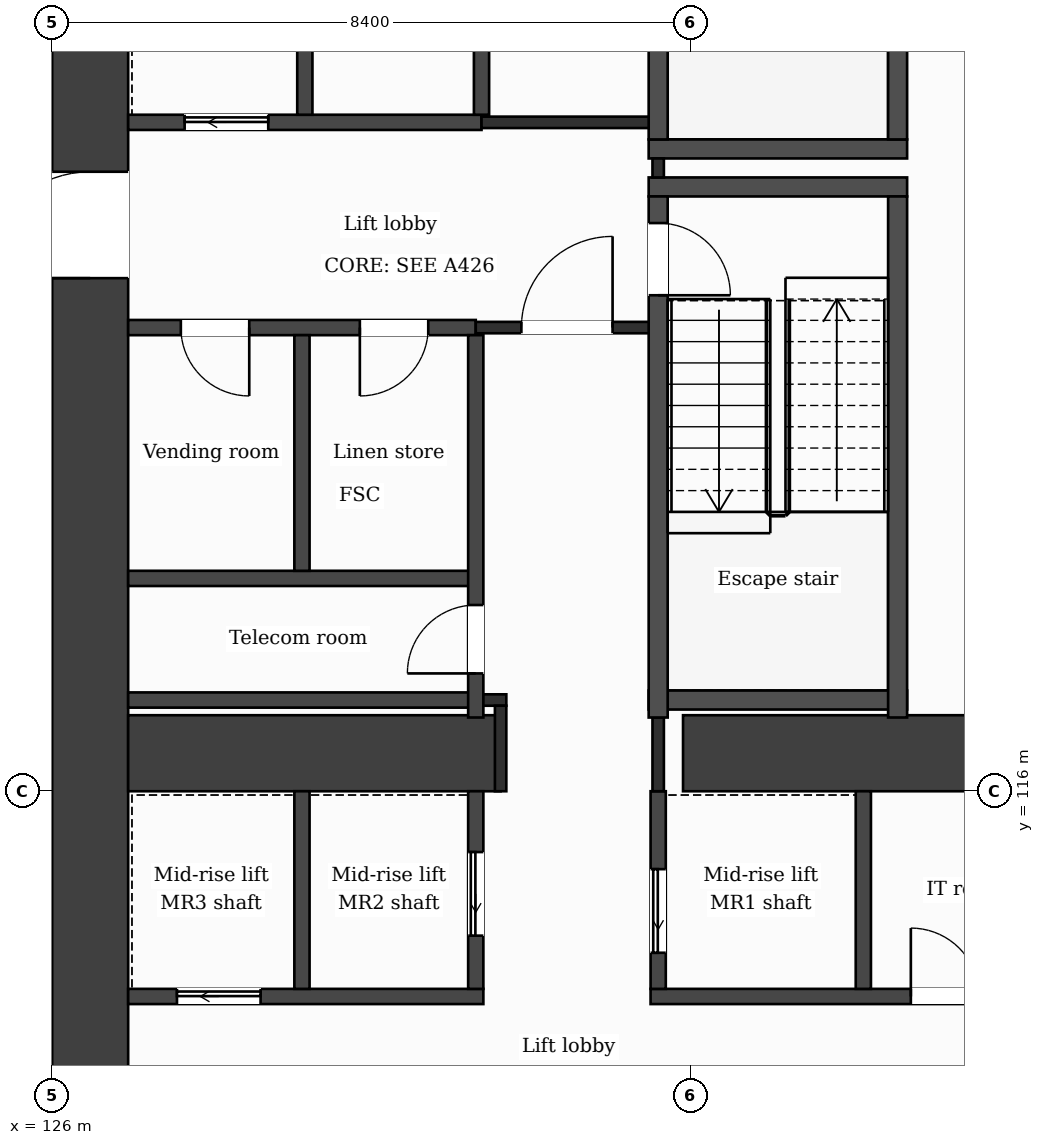
"""IFC4 building model, lengths in metres.
Left out: names, types, materials, properties, quantities, classifications, styles, units other than length and angle.
Written with IfcOpenShell. Run it as: python <this file> out.ifc"""

import sys

from ifc_helpers import new_model, si_unit, direction, frame, frame_2d, origin, place, context, subcontext, project, spatial, rectangle, extrude, element, fill, save


model = new_model("IFC4")
c1 = context("Model", 3, precision=1e-05, world=origin(), true_north=direction((0.0, 1.0)))
c2 = subcontext(c1, "Body", "Model", "MODEL_VIEW")
j1 = project(units=[si_unit("LENGTHUNIT", "METRE"), si_unit("PLANEANGLEUNIT", "RADIAN")], contexts=[c1])
p1 = place(None, origin())
s1 = spatial("IfcSite", under=j1, at=p1, CompositionType="ELEMENT")
p2 = place(p1, origin())
s2 = spatial("IfcBuilding", under=s1, at=p2, CompositionType="ELEMENT")
p3 = place(p2, frame((0.0, 0.0, 109.5)))
s3 = spatial("IfcBuildingStorey", under=s2, at=p3, CompositionType="ELEMENT", Elevation=109.5)
p4 = place(p3, frame((137.732, 131.9, 0.0), z_axis=(0.0, 0.0, 1.0), x_axis=(0.133411141623, -0.991060778808, 0.0)))
e1 = element("IfcWall", 1, at=p4, inside=s3, PredefinedType="SHEAR", context=c2, shape_type="SweptSolid", body=[
    extrude(rectangle(XDim=21.189, YDim=1.0, at=frame_2d((10.595, 0.0))), origin(), (0.0, 0.0, 1.0), 3.7),
])
p5 = place(p3, frame((126.5, 110.9, 0.0), z_axis=(0.0, 0.0, 1.0), x_axis=(0.0, 1.0, 0.0)))
e2 = element("IfcWall", 2, at=p5, inside=s3, PredefinedType="SHEAR", context=c2, shape_type="SweptSolid", body=[
    extrude(rectangle(XDim=21.0, YDim=1.0, at=frame_2d((10.5, 0.0))), origin(), (0.0, 0.0, 1.0), 3.7),
])
p6 = place(p5, frame((11.85, 0.0, 0.0)))
e3 = element("IfcOpeningElement", 3, at=p6, cuts=e2, PredefinedType="OPENING", context=c2, shape_type="SweptSolid", body=[
    extrude(rectangle(XDim=1.4, YDim=2.1, at=frame_2d((0.7, 1.05))), frame((0.0, 0.51, 0.0), z_axis=(0.0, -1.0, 0.0), x_axis=(1.0, 0.0, 0.0)), (0.0, 0.0, 1.0), 1.02),
])
p7 = place(p3, frame((127.0, 116.5, 0.0), z_axis=(0.0, 0.0, 1.0), x_axis=(1.0, 0.0, 0.0)))
e4 = element("IfcWall", 4, at=p7, inside=s3, PredefinedType="SHEAR", context=c2, shape_type="SweptSolid", body=[
    extrude(rectangle(XDim=4.9, YDim=1.0, at=frame_2d((2.45, 0.0))), origin(), (0.0, 0.0, 1.0), 3.7),
])
p8 = place(p3, frame((134.3, 116.5, 0.0), z_axis=(0.0, 0.0, 1.0), x_axis=(1.0, 0.0, 0.0)))
e5 = element("IfcWall", 5, at=p8, inside=s3, PredefinedType="SHEAR", context=c2, shape_type="SweptSolid", body=[
    extrude(rectangle(XDim=5.077, YDim=1.0, at=frame_2d((2.539, 0.0))), origin(), (0.0, 0.0, 1.0), 3.7),
])
p9 = place(p3, frame((127.0, 113.3, 0.0), z_axis=(0.0, 0.0, 1.0), x_axis=(1.0, 0.0, 0.0)))
e6 = element("IfcWall", 6, at=p9, inside=s3, PredefinedType="PARTITIONING", context=c2, shape_type="SweptSolid", body=[
    extrude(rectangle(XDim=4.673, YDim=0.2, at=frame_2d((2.336, 0.0))), origin(), (0.0, 0.0, 1.0), 3.38),
])
p10 = place(p9, frame((0.642, 0.0, 0.0)))
e7 = element("IfcOpeningElement", 7, at=p10, cuts=e6, PredefinedType="OPENING", context=c2, shape_type="SweptSolid", body=[
    extrude(rectangle(XDim=1.1, YDim=2.1, at=frame_2d((0.55, 1.05))), frame((0.0, 0.11, 0.0), z_axis=(0.0, -1.0, 0.0), x_axis=(1.0, 0.0, 0.0)), (0.0, 0.0, 1.0), 0.22),
])
p11 = place(p3, frame((133.873, 113.3, 0.0), z_axis=(0.0, 0.0, 1.0), x_axis=(1.0, 0.0, 0.0)))
e8 = element("IfcWall", 8, at=p11, inside=s3, PredefinedType="PARTITIONING", context=c2, shape_type="SweptSolid", body=[
    extrude(rectangle(XDim=5.888, YDim=0.2, at=frame_2d((2.944, 0.0))), origin(), (0.0, 0.0, 1.0), 3.38),
])
p12 = place(p11, frame((3.424, 0.0, 0.0)))
e9 = element("IfcOpeningElement", 9, at=p12, cuts=e8, PredefinedType="OPENING", context=c2, shape_type="SweptSolid", body=[
    extrude(rectangle(XDim=0.9, YDim=2.1, at=frame_2d((0.45, 1.05))), frame((0.0, 0.11, 0.0), z_axis=(0.0, -1.0, 0.0), x_axis=(1.0, 0.0, 0.0)), (0.0, 0.0, 1.0), 0.22),
])
p13 = place(p3, frame((127.0, 117.2, 0.0), z_axis=(0.0, 0.0, 1.0), x_axis=(1.0, 0.0, 0.0)))
e10 = element("IfcWall", 10, at=p13, inside=s3, PredefinedType="PARTITIONING", context=c2, shape_type="SweptSolid", body=[
    extrude(rectangle(XDim=4.573, YDim=0.2, at=frame_2d((2.287, 0.0))), origin(), (0.0, 0.0, 1.0), 3.38),
])
p14 = place(p3, frame((131.573, 117.2, 0.0), z_axis=(0.0, 0.0, 1.0), x_axis=(1.0, 0.0, 0.0)))
e11 = element("IfcWall", 11, at=p14, inside=s3, PredefinedType="PARTITIONING", context=c2, shape_type="SweptSolid", body=[
    extrude(rectangle(XDim=0.402, YDim=0.15, at=frame_2d((0.201, 0.0))), origin(), (0.0, 0.0, 1.0), 3.38),
])
p15 = place(p3, frame((133.848, 117.2, 0.0), z_axis=(0.0, 0.0, 1.0), x_axis=(1.0, 0.0, 0.0)))
e12 = element("IfcWall", 12, at=p15, inside=s3, PredefinedType="PARTITIONING", context=c2, shape_type="SweptSolid", body=[
    extrude(rectangle(XDim=3.4, YDim=0.25, at=frame_2d((1.7, 0.0))), origin(), (0.0, 0.0, 1.0), 3.38),
])
p16 = place(p3, frame((127.0, 118.8, 0.0), z_axis=(0.0, 0.0, 1.0), x_axis=(1.0, 0.0, 0.0)))
e13 = element("IfcWall", 13, at=p16, inside=s3, PredefinedType="PARTITIONING", context=c2, shape_type="SweptSolid", body=[
    extrude(rectangle(XDim=4.573, YDim=0.2, at=frame_2d((2.287, 0.0))), origin(), (0.0, 0.0, 1.0), 3.38),
])
p17 = place(p3, frame((127.0, 122.1, 0.0), z_axis=(0.0, 0.0, 1.0), x_axis=(1.0, 0.0, 0.0)))
e14 = element("IfcWall", 14, at=p17, inside=s3, PredefinedType="PARTITIONING", context=c2, shape_type="SweptSolid", body=[
    extrude(rectangle(XDim=4.573, YDim=0.2, at=frame_2d((2.287, 0.0))), origin(), (0.0, 0.0, 1.0), 3.38),
])
p18 = place(p17, frame((3.048, 0.0, 0.0)))
e15 = element("IfcOpeningElement", 15, at=p18, cuts=e14, PredefinedType="OPENING", context=c2, shape_type="SweptSolid", body=[
    extrude(rectangle(XDim=0.9, YDim=2.1, at=frame_2d((0.45, 1.05))), frame((0.0, 0.11, 0.0), z_axis=(0.0, -1.0, 0.0), x_axis=(1.0, 0.0, 0.0)), (0.0, 0.0, 1.0), 0.22),
])
p19 = place(p17, frame((0.693, 0.0, 0.0)))
e16 = element("IfcOpeningElement", 16, at=p19, cuts=e14, PredefinedType="OPENING", context=c2, shape_type="SweptSolid", body=[
    extrude(rectangle(XDim=0.9, YDim=2.1, at=frame_2d((0.45, 1.05))), frame((0.0, 0.11, 0.0), z_axis=(0.0, -1.0, 0.0), x_axis=(1.0, 0.0, 0.0)), (0.0, 0.0, 1.0), 0.22),
])
p20 = place(p3, frame((131.573, 122.1, 0.0), z_axis=(0.0, 0.0, 1.0), x_axis=(1.0, 0.0, 0.0)))
e17 = element("IfcWall", 17, at=p20, inside=s3, PredefinedType="PARTITIONING", context=c2, shape_type="SweptSolid", body=[
    extrude(rectangle(XDim=2.4, YDim=0.15, at=frame_2d((1.2, 0.0))), origin(), (0.0, 0.0, 1.0), 3.38),
])
p21 = place(p20, frame((0.6, 0.0, 0.0)))
e18 = element("IfcOpeningElement", 18, at=p21, cuts=e17, PredefinedType="OPENING", context=c2, shape_type="SweptSolid", body=[
    extrude(rectangle(XDim=1.2, YDim=2.1, at=frame_2d((0.6, 1.05))), frame((0.0, 0.085, 0.0), z_axis=(0.0, -1.0, 0.0), x_axis=(1.0, 0.0, 0.0)), (0.0, 0.0, 1.0), 0.17),
])
p22 = place(p3, frame((100.8, 122.45, 0.0), z_axis=(0.0, 0.0, 1.0), x_axis=(1.0, 0.0, 0.0)))
e19 = element("IfcWall", 19, at=p22, inside=s3, PredefinedType="PARTITIONING", context=c2, shape_type="SweptSolid", body=[
    extrude(rectangle(XDim=25.2, YDim=0.15, at=frame_2d((12.6, 0.0))), origin(), (0.0, 0.0, 1.0), 3.38),
])
for number, where, z_axis, x_axis in (
    (20, (133.848, 123.95, 0.0), (0.0, 0.0, 1.0), (1.0, 0.0, 0.0)),
    (21, (133.848, 124.45, 0.0), (0.0, 0.0, 1.0), (1.0, 0.0, 0.0)),
):
    element("IfcWall", number, at=place(p3, frame(where, z_axis=z_axis, x_axis=x_axis)), inside=s3, PredefinedType="PARTITIONING", context=c2, shape_type="SweptSolid", body=[
        extrude(rectangle(XDim=3.4, YDim=0.25, at=frame_2d((1.7, 0.0))), origin(), (0.0, 0.0, 1.0), 3.38),
    ])
p23 = place(p3, frame((100.8, 124.45, 0.0), z_axis=(0.0, 0.0, 1.0), x_axis=(1.0, 0.0, 0.0)))
e22 = element("IfcWall", 22, at=p23, inside=s3, PredefinedType="PARTITIONING", context=c2, shape_type="SweptSolid", body=[
    extrude(rectangle(XDim=25.2, YDim=0.15, at=frame_2d((12.6, 0.0))), origin(), (0.0, 0.0, 1.0), 3.38),
])
p24 = place(p23, frame((3.7, 0.0, 0.0)))
e23 = element("IfcOpeningElement", 23, at=p24, cuts=e22, PredefinedType="OPENING", context=c2, shape_type="SweptSolid", body=[
    extrude(rectangle(XDim=1.0, YDim=2.1, at=frame_2d((0.5, 1.05))), frame((0.0, 0.085, 0.0), z_axis=(0.0, -1.0, 0.0), x_axis=(1.0, 0.0, 0.0)), (0.0, 0.0, 1.0), 0.17),
])
p25 = place(p23, frame((9.75, 0.0, 0.0)))
e24 = element("IfcOpeningElement", 24, at=p25, cuts=e22, PredefinedType="OPENING", context=c2, shape_type="SweptSolid", body=[
    extrude(rectangle(XDim=1.0, YDim=2.1, at=frame_2d((0.5, 1.05))), frame((0.0, 0.085, 0.0), z_axis=(0.0, -1.0, 0.0), x_axis=(1.0, 0.0, 0.0)), (0.0, 0.0, 1.0), 0.17),
])
p26 = place(p23, frame((13.575, 0.0, 0.0)))
e25 = element("IfcOpeningElement", 25, at=p26, cuts=e22, PredefinedType="OPENING", context=c2, shape_type="SweptSolid", body=[
    extrude(rectangle(XDim=1.0, YDim=2.1, at=frame_2d((0.5, 1.05))), frame((0.0, 0.085, 0.0), z_axis=(0.0, -1.0, 0.0), x_axis=(1.0, 0.0, 0.0)), (0.0, 0.0, 1.0), 0.17),
])
p27 = place(p23, frame((18.125, 0.0, 0.0)))
e26 = element("IfcOpeningElement", 26, at=p27, cuts=e22, PredefinedType="OPENING", context=c2, shape_type="SweptSolid", body=[
    extrude(rectangle(XDim=1.0, YDim=2.1, at=frame_2d((0.5, 1.05))), frame((0.0, 0.085, 0.0), z_axis=(0.0, -1.0, 0.0), x_axis=(1.0, 0.0, 0.0)), (0.0, 0.0, 1.0), 0.17),
])
p28 = place(p23, frame((22.35, 0.0, 0.0)))
e27 = element("IfcOpeningElement", 27, at=p28, cuts=e22, PredefinedType="OPENING", context=c2, shape_type="SweptSolid", body=[
    extrude(rectangle(XDim=1.0, YDim=2.1, at=frame_2d((0.5, 1.05))), frame((0.0, 0.085, 0.0), z_axis=(0.0, -1.0, 0.0), x_axis=(1.0, 0.0, 0.0)), (0.0, 0.0, 1.0), 0.17),
])
p29 = place(p3, frame((127.0, 124.8, 0.0), z_axis=(0.0, 0.0, 1.0), x_axis=(1.0, 0.0, 0.0)))
e28 = element("IfcWall", 28, at=p29, inside=s3, PredefinedType="PARTITIONING", context=c2, shape_type="SweptSolid", body=[
    extrude(rectangle(XDim=4.649, YDim=0.2, at=frame_2d((2.324, 0.0))), origin(), (0.0, 0.0, 1.0), 3.38),
])
p30 = place(p29, frame((0.743, 0.0, 0.0)))
e29 = element("IfcOpeningElement", 29, at=p30, cuts=e28, PredefinedType="OPENING", context=c2, shape_type="SweptSolid", body=[
    extrude(rectangle(XDim=1.1, YDim=2.1, at=frame_2d((0.55, 1.05))), frame((0.0, 0.11, 0.0), z_axis=(0.0, -1.0, 0.0), x_axis=(1.0, 0.0, 0.0)), (0.0, 0.0, 1.0), 0.22),
])
p31 = place(p3, frame((131.649, 124.8, 0.0), z_axis=(0.0, 0.0, 1.0), x_axis=(1.0, 0.0, 0.0)))
e30 = element("IfcWall", 30, at=p31, inside=s3, PredefinedType="PARTITIONING", context=c2, shape_type="SweptSolid", body=[
    extrude(rectangle(XDim=2.449, YDim=0.15, at=frame_2d((1.225, 0.0))), origin(), (0.0, 0.0, 1.0), 3.38),
])
p32 = place(p3, frame((129.287, 113.4, 0.0), z_axis=(0.0, 0.0, 1.0), x_axis=(0.0, 1.0, 0.0)))
e31 = element("IfcWall", 31, at=p32, inside=s3, PredefinedType="PARTITIONING", context=c2, shape_type="SweptSolid", body=[
    extrude(rectangle(XDim=2.6, YDim=0.2, at=frame_2d((1.3, 0.0))), origin(), (0.0, 0.0, 1.0), 3.38),
])
for number, where, z_axis, x_axis in (
    (32, (129.287, 118.9, 0.0), (0.0, 0.0, 1.0), (0.0, 1.0, 0.0)),
    (33, (129.324, 124.9, 0.0), (0.0, 0.0, 1.0), (0.0, 1.0, 0.0)),
):
    element("IfcWall", number, at=place(p3, frame(where, z_axis=z_axis, x_axis=x_axis)), inside=s3, PredefinedType="PARTITIONING", context=c2, shape_type="SweptSolid", body=[
        extrude(rectangle(XDim=3.1, YDim=0.2, at=frame_2d((1.55, 0.0))), origin(), (0.0, 0.0, 1.0), 3.38),
    ])
p33 = place(p3, frame((131.573, 113.4, 0.0), z_axis=(0.0, 0.0, 1.0), x_axis=(0.0, 1.0, 0.0)))
e34 = element("IfcWall", 34, at=p33, inside=s3, PredefinedType="PARTITIONING", context=c2, shape_type="SweptSolid", body=[
    extrude(rectangle(XDim=2.6, YDim=0.2, at=frame_2d((1.3, 0.0))), origin(), (0.0, 0.0, 1.0), 3.38),
])
p34 = place(p33, frame((0.7, 0.0, 0.0)))
e35 = element("IfcOpeningElement", 35, at=p34, cuts=e34, PredefinedType="OPENING", context=c2, shape_type="SweptSolid", body=[
    extrude(rectangle(XDim=1.1, YDim=2.1, at=frame_2d((0.55, 1.05))), frame((0.0, 0.11, 0.0), z_axis=(0.0, -1.0, 0.0), x_axis=(1.0, 0.0, 0.0)), (0.0, 0.0, 1.0), 0.22),
])
p35 = place(p3, frame((131.573, 116.97, 0.0), z_axis=(0.0, 0.0, 1.0), x_axis=(0.0, 1.0, 0.0)))
e36 = element("IfcWall", 36, at=p35, inside=s3, PredefinedType="PARTITIONING", context=c2, shape_type="SweptSolid", body=[
    extrude(rectangle(XDim=5.03, YDim=0.2, at=frame_2d((2.515, 0.0))), origin(), (0.0, 0.0, 1.0), 3.38),
])
p36 = place(p35, frame((0.58, 0.0, 0.0)))
e37 = element("IfcOpeningElement", 37, at=p36, cuts=e36, PredefinedType="OPENING", context=c2, shape_type="SweptSolid", body=[
    extrude(rectangle(XDim=0.9, YDim=2.1, at=frame_2d((0.45, 1.05))), frame((0.0, 0.11, 0.0), z_axis=(0.0, -1.0, 0.0), x_axis=(1.0, 0.0, 0.0)), (0.0, 0.0, 1.0), 0.22),
])
p37 = place(p3, frame((131.649, 124.9, 0.0), z_axis=(0.0, 0.0, 1.0), x_axis=(0.0, 1.0, 0.0)))
e38 = element("IfcWall", 38, at=p37, inside=s3, PredefinedType="PARTITIONING", context=c2, shape_type="SweptSolid", body=[
    extrude(rectangle(XDim=3.1, YDim=0.2, at=frame_2d((1.55, 0.0))), origin(), (0.0, 0.0, 1.0), 3.38),
])
p38 = place(p3, frame((131.9, 116.0, 0.0), z_axis=(0.0, 0.0, 1.0), x_axis=(0.0, 1.0, 0.0)))
e39 = element("IfcWall", 39, at=p38, inside=s3, PredefinedType="PARTITIONING", context=c2, shape_type="SweptSolid", body=[
    extrude(rectangle(XDim=1.125, YDim=0.15, at=frame_2d((0.562, 0.0))), origin(), (0.0, 0.0, 1.0), 3.38),
])
p39 = place(p3, frame((133.973, 113.4, 0.0), z_axis=(0.0, 0.0, 1.0), x_axis=(0.0, 1.0, 0.0)))
e40 = element("IfcWall", 40, at=p39, inside=s3, PredefinedType="PARTITIONING", context=c2, shape_type="SweptSolid", body=[
    extrude(rectangle(XDim=2.6, YDim=0.2, at=frame_2d((1.3, 0.0))), origin(), (0.0, 0.0, 1.0), 3.38),
])
p40 = place(p39, frame((0.475, 0.0, 0.0)))
e41 = element("IfcOpeningElement", 41, at=p40, cuts=e40, PredefinedType="OPENING", context=c2, shape_type="SweptSolid", body=[
    extrude(rectangle(XDim=1.1, YDim=2.1, at=frame_2d((0.55, 1.05))), frame((0.0, 0.11, 0.0), z_axis=(0.0, -1.0, 0.0), x_axis=(1.0, 0.0, 0.0)), (0.0, 0.0, 1.0), 0.22),
])
p41 = place(p3, frame((133.973, 116.0, 0.0), z_axis=(0.0, 0.0, 1.0), x_axis=(0.0, 1.0, 0.0)))
e42 = element("IfcWall", 42, at=p41, inside=s3, PredefinedType="PARTITIONING", context=c2, shape_type="SweptSolid", body=[
    extrude(rectangle(XDim=0.97, YDim=0.15, at=frame_2d((0.485, 0.0))), origin(), (0.0, 0.0, 1.0), 3.38),
])
p42 = place(p3, frame((133.973, 124.075, 0.0), z_axis=(0.0, 0.0, 1.0), x_axis=(0.0, 1.0, 0.0)))
e43 = element("IfcWall", 43, at=p42, inside=s3, PredefinedType="PARTITIONING", context=c2, shape_type="SweptSolid", body=[
    extrude(rectangle(XDim=0.25, YDim=0.15, at=frame_2d((0.125, 0.0))), origin(), (0.0, 0.0, 1.0), 3.38),
])
p43 = place(p3, frame((133.973, 116.97, 0.0), z_axis=(0.0, 0.0, 1.0), x_axis=(0.0, 1.0, 0.0)))
e44 = element("IfcWall", 44, at=p43, inside=s3, PredefinedType="PARTITIONING", context=c2, shape_type="SweptSolid", body=[
    extrude(rectangle(XDim=6.855, YDim=0.25, at=frame_2d((3.427, 0.0))), origin(), (0.0, 0.0, 1.0), 3.38),
])
p44 = place(p43, frame((5.555, 0.0, 0.0)))
e45 = element("IfcOpeningElement", 45, at=p44, cuts=e44, PredefinedType="OPENING", context=c2, shape_type="SweptSolid", body=[
    extrude(rectangle(XDim=0.95, YDim=2.1, at=frame_2d((0.475, 1.05))), frame((0.0, 0.135, 0.0), z_axis=(0.0, -1.0, 0.0), x_axis=(1.0, 0.0, 0.0)), (0.0, 0.0, 1.0), 0.27),
])
p45 = place(p3, frame((133.973, 124.575, 0.0), z_axis=(0.0, 0.0, 1.0), x_axis=(0.0, 1.0, 0.0)))
e46 = element("IfcWall", 46, at=p45, inside=s3, PredefinedType="PARTITIONING", context=c2, shape_type="SweptSolid", body=[
    extrude(rectangle(XDim=6.855, YDim=0.25, at=frame_2d((3.427, 0.0))), origin(), (0.0, 0.0, 1.0), 3.38),
])
p46 = place(p45, frame((5.325, 0.0, 0.0)))
e47 = element("IfcOpeningElement", 47, at=p46, cuts=e46, PredefinedType="OPENING", context=c2, shape_type="SweptSolid", body=[
    extrude(rectangle(XDim=1.0, YDim=2.1, at=frame_2d((0.5, 1.05))), frame((0.0, 0.135, 0.0), z_axis=(0.0, -1.0, 0.0), x_axis=(1.0, 0.0, 0.0)), (0.0, 0.0, 1.0), 0.27),
])
p47 = place(p3, frame((136.672, 113.4, 0.0), z_axis=(0.0, 0.0, 1.0), x_axis=(0.0, 1.0, 0.0)))
e48 = element("IfcWall", 48, at=p47, inside=s3, PredefinedType="PARTITIONING", context=c2, shape_type="SweptSolid", body=[
    extrude(rectangle(XDim=2.6, YDim=0.2, at=frame_2d((1.3, 0.0))), origin(), (0.0, 0.0, 1.0), 3.38),
])
for number, where, z_axis, x_axis in (
    (49, (137.123, 116.97, 0.0), (0.0, 0.0, 1.0), (0.0, 1.0, 0.0)),
    (50, (137.123, 124.575, 0.0), (0.0, 0.0, 1.0), (0.0, 1.0, 0.0)),
):
    element("IfcWall", number, at=place(p3, frame(where, z_axis=z_axis, x_axis=x_axis)), inside=s3, PredefinedType="PARTITIONING", context=c2, shape_type="SweptSolid", body=[
        extrude(rectangle(XDim=6.855, YDim=0.25, at=frame_2d((3.427, 0.0))), origin(), (0.0, 0.0, 1.0), 3.38),
    ])
p48 = place(p21, origin())
e51 = element("IfcDoor", 51, at=p48, inside=s3, OperationType="SINGLE_SWING_RIGHT", PredefinedType="DOOR", context=c2, shape_type="SweptSolid", body=[
    extrude(rectangle(XDim=1.2, YDim=2.1, at=frame_2d((0.6, 1.05))), frame((0.0, 0.025, 0.0), z_axis=(0.0, -1.0, 0.0), x_axis=(1.0, 0.0, 0.0)), (0.0, 0.0, 1.0), 0.05),
])
fill(e18, e51)
p49 = place(p30, origin())
e52 = element("IfcDoor", 52, at=p49, inside=s3, OperationType="SLIDING_TO_LEFT", PredefinedType="DOOR", context=c2, shape_type="SweptSolid", body=[
    extrude(rectangle(XDim=1.1, YDim=2.1, at=frame_2d((0.55, 1.05))), frame((0.0, 0.025, 0.0), z_axis=(0.0, -1.0, 0.0), x_axis=(1.0, 0.0, 0.0)), (0.0, 0.0, 1.0), 0.05),
])
fill(e29, e52)
p50 = place(p18, origin())
e53 = element("IfcDoor", 53, at=p50, inside=s3, OperationType="SINGLE_SWING_LEFT", PredefinedType="DOOR", context=c2, shape_type="SweptSolid", body=[
    extrude(rectangle(XDim=0.9, YDim=2.1, at=frame_2d((0.45, 1.05))), frame((0.0, 0.025, 0.0), z_axis=(0.0, -1.0, 0.0), x_axis=(1.0, 0.0, 0.0)), (0.0, 0.0, 1.0), 0.05),
])
fill(e15, e53)
p51 = place(p19, origin())
e54 = element("IfcDoor", 54, at=p51, inside=s3, OperationType="SINGLE_SWING_RIGHT", PredefinedType="DOOR", context=c2, shape_type="SweptSolid", body=[
    extrude(rectangle(XDim=0.9, YDim=2.1, at=frame_2d((0.45, 1.05))), frame((0.0, 0.025, 0.0), z_axis=(0.0, -1.0, 0.0), x_axis=(1.0, 0.0, 0.0)), (0.0, 0.0, 1.0), 0.05),
])
fill(e16, e54)
p52 = place(p44, origin())
e55 = element("IfcDoor", 55, at=p52, inside=s3, OperationType="SINGLE_SWING_LEFT", PredefinedType="DOOR", context=c2, shape_type="SweptSolid", body=[
    extrude(rectangle(XDim=0.95, YDim=2.1, at=frame_2d((0.475, 1.05))), frame((0.0, 0.025, 0.0), z_axis=(0.0, -1.0, 0.0), x_axis=(1.0, 0.0, 0.0)), (0.0, 0.0, 1.0), 0.05),
])
fill(e45, e55)
p53 = place(p36, origin())
e56 = element("IfcDoor", 56, at=p53, inside=s3, OperationType="SINGLE_SWING_LEFT", PredefinedType="DOOR", context=c2, shape_type="SweptSolid", body=[
    extrude(rectangle(XDim=0.9, YDim=2.1, at=frame_2d((0.45, 1.05))), frame((0.0, 0.025, 0.0), z_axis=(0.0, -1.0, 0.0), x_axis=(1.0, 0.0, 0.0)), (0.0, 0.0, 1.0), 0.05),
])
fill(e37, e56)
p54 = place(p40, origin())
e57 = element("IfcDoor", 57, at=p54, inside=s3, OperationType="SLIDING_TO_LEFT", PredefinedType="DOOR", context=c2, shape_type="SweptSolid", body=[
    extrude(rectangle(XDim=1.1, YDim=2.1, at=frame_2d((0.55, 1.05))), frame((0.0, 0.025, 0.0), z_axis=(0.0, -1.0, 0.0), x_axis=(1.0, 0.0, 0.0)), (0.0, 0.0, 1.0), 0.05),
])
fill(e41, e57)
p55 = place(p34, origin())
e58 = element("IfcDoor", 58, at=p55, inside=s3, OperationType="SLIDING_TO_LEFT", PredefinedType="DOOR", context=c2, shape_type="SweptSolid", body=[
    extrude(rectangle(XDim=1.1, YDim=2.1, at=frame_2d((0.55, 1.05))), frame((0.0, 0.025, 0.0), z_axis=(0.0, -1.0, 0.0), x_axis=(1.0, 0.0, 0.0)), (0.0, 0.0, 1.0), 0.05),
])
fill(e35, e58)
p56 = place(p10, origin())
e59 = element("IfcDoor", 59, at=p56, inside=s3, OperationType="SLIDING_TO_LEFT", PredefinedType="DOOR", context=c2, shape_type="SweptSolid", body=[
    extrude(rectangle(XDim=1.1, YDim=2.1, at=frame_2d((0.55, 1.05))), frame((0.0, 0.025, 0.0), z_axis=(0.0, -1.0, 0.0), x_axis=(1.0, 0.0, 0.0)), (0.0, 0.0, 1.0), 0.05),
])
fill(e7, e59)
p57 = place(p12, origin())
e60 = element("IfcDoor", 60, at=p57, inside=s3, OperationType="SINGLE_SWING_LEFT", PredefinedType="DOOR", context=c2, shape_type="SweptSolid", body=[
    extrude(rectangle(XDim=0.9, YDim=2.1, at=frame_2d((0.45, 1.05))), frame((0.0, 0.025, 0.0), z_axis=(0.0, -1.0, 0.0), x_axis=(1.0, 0.0, 0.0)), (0.0, 0.0, 1.0), 0.05),
])
fill(e9, e60)
p58 = place(p6, origin())
e61 = element("IfcDoor", 61, at=p58, inside=s3, OperationType="SINGLE_SWING_LEFT", PredefinedType="DOOR", context=c2, shape_type="SweptSolid", body=[
    extrude(rectangle(XDim=1.4, YDim=2.1, at=frame_2d((0.7, 1.05))), frame((0.0, 0.025, 0.0), z_axis=(0.0, -1.0, 0.0), x_axis=(1.0, 0.0, 0.0)), (0.0, 0.0, 1.0), 0.05),
])
fill(e3, e61)
save(model, sys.argv[1])
